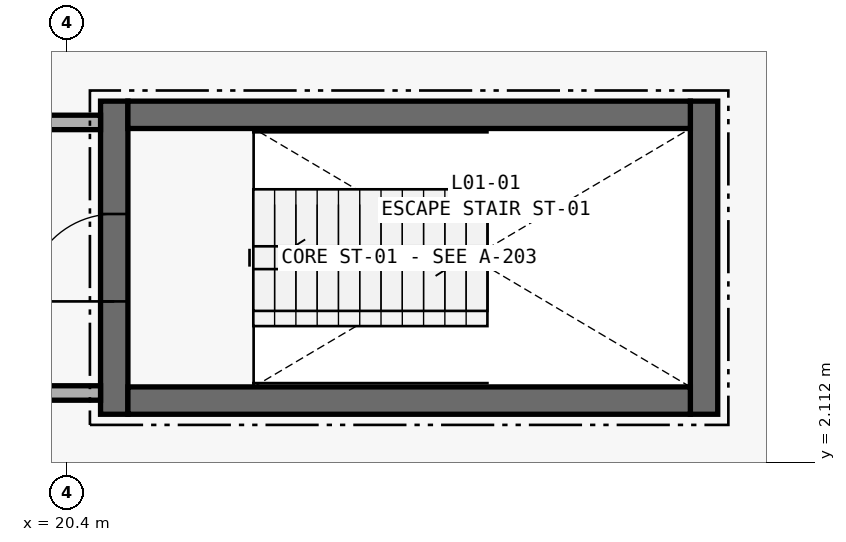
"""IFC4 building model, lengths in metres.
Left out: names, types, materials, properties, quantities, classifications, styles, units other than length and angle.
Written with IfcOpenShell. Run it as: python <this file> out.ifc"""

import sys

from ifc_helpers import new_model, si_unit, direction, frame, frame_2d, origin, place, context, subcontext, project, spatial, rectangle, extrude, element, fill, save


model = new_model("IFC4")
c1 = context("Model", 3, precision=1e-05, world=origin(), true_north=direction((0.0, 1.0)))
c2 = subcontext(c1, "Body", "Model", "MODEL_VIEW")
j1 = project(units=[si_unit("LENGTHUNIT", "METRE"), si_unit("PLANEANGLEUNIT", "RADIAN")], contexts=[c1])
p1 = place(None, origin())
s1 = spatial("IfcSite", under=j1, at=p1, CompositionType="ELEMENT")
p2 = place(p1, origin())
s2 = spatial("IfcBuilding", under=s1, at=p2, CompositionType="ELEMENT")
p3 = place(p2, frame((0.0, 0.0, 4.8)))
s3 = spatial("IfcBuildingStorey", under=s2, at=p3, CompositionType="ELEMENT", Elevation=4.8)
p4 = place(p3, frame((21.02, 2.74, 0.0), z_axis=(0.0, 0.0, 1.0), x_axis=(0.0, 1.0, 0.0)))
e1 = element("IfcWall", 1, at=p4, inside=s3, PredefinedType="SHEAR", context=c2, shape_type="SweptSolid", body=[
    extrude(rectangle(XDim=4.12, YDim=0.36, at=frame_2d((2.06, 0.0))), origin(), (0.0, 0.0, 1.0), 3.88),
])
p5 = place(p4, frame((1.485, 0.0, 0.0)))
e2 = element("IfcOpeningElement", 2, at=p5, cuts=e1, PredefinedType="OPENING", context=c2, shape_type="SweptSolid", body=[
    extrude(rectangle(XDim=1.15, YDim=2.15, at=frame_2d((0.575, 1.075))), frame((0.0, 0.195, 0.0), z_axis=(0.0, -1.0, 0.0), x_axis=(1.0, 0.0, 0.0)), (0.0, 0.0, 1.0), 0.39),
])
p6 = place(p3, frame((28.78, 2.74, 0.0), z_axis=(0.0, 0.0, 1.0), x_axis=(0.0, 1.0, 0.0)))
e3 = element("IfcWall", 3, at=p6, inside=s3, PredefinedType="SHEAR", context=c2, shape_type="SweptSolid", body=[
    extrude(rectangle(XDim=4.12, YDim=0.36, at=frame_2d((2.06, 0.0))), origin(), (0.0, 0.0, 1.0), 3.88),
])
for number, where, z_axis, x_axis in (
    (4, (21.2, 6.68, 0.0), (0.0, 0.0, 1.0), (1.0, 0.0, 0.0)),
    (5, (21.2, 2.92, 0.0), (0.0, 0.0, 1.0), (1.0, 0.0, 0.0)),
):
    element("IfcWall", number, at=place(p3, frame(where, z_axis=z_axis, x_axis=x_axis)), inside=s3, PredefinedType="SHEAR", context=c2, shape_type="SweptSolid", body=[
        extrude(rectangle(XDim=7.4, YDim=0.36, at=frame_2d((3.7, 0.0))), origin(), (0.0, 0.0, 1.0), 3.88),
    ])
p7 = place(p3, frame((16.825, 3.02, 0.0), z_axis=(0.0, 0.0, 1.0), x_axis=(1.0, 0.0, 0.0)))
e6 = element("IfcWall", 6, at=p7, inside=s3, PredefinedType="PARTITIONING", context=c2, shape_type="SweptSolid", body=[
    extrude(rectangle(XDim=4.015, YDim=0.19, at=frame_2d((2.008, 0.0))), origin(), (0.0, 0.0, 1.0), 2.76),
])
p8 = place(p3, frame((19.685, 6.58, 0.0), z_axis=(0.0, 0.0, 1.0), x_axis=(1.0, 0.0, 0.0)))
e7 = element("IfcWall", 7, at=p8, inside=s3, PredefinedType="PARTITIONING", context=c2, shape_type="SweptSolid", body=[
    extrude(rectangle(XDim=1.155, YDim=0.19, at=frame_2d((0.578, 0.0))), origin(), (0.0, 0.0, 1.0), 2.76),
])
p9 = place(p5, origin())
e8 = element("IfcDoor", 8, at=p9, inside=s3, OperationType="SINGLE_SWING_LEFT", PredefinedType="DOOR", context=c2, shape_type="SweptSolid", body=[
    extrude(rectangle(XDim=1.15, YDim=2.15, at=frame_2d((0.575, 1.075))), frame((0.0, 0.025, 0.0), z_axis=(0.0, -1.0, 0.0), x_axis=(1.0, 0.0, 0.0)), (0.0, 0.0, 1.0), 0.05),
])
fill(e2, e8)
save(model, sys.argv[1])
